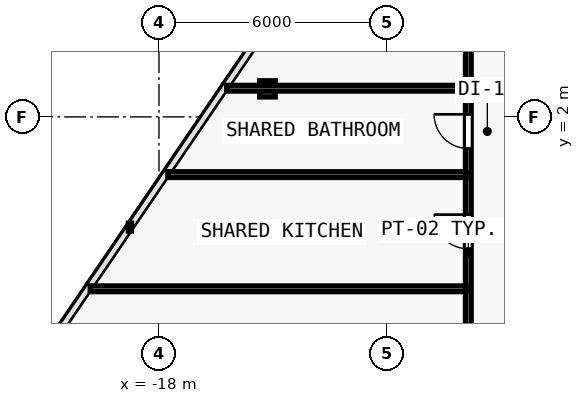
"""IFC4 building model, lengths in metres.
Left out: names, types, materials, properties, quantities, classifications, styles, units other than length and angle.
Written with IfcOpenShell. Run it as: python <this file> out.ifc"""

import sys

from ifc_helpers import new_model, si_unit, direction, frame, frame_2d, origin, origin_2d, place, context, subcontext, project, spatial, rectangle, i_section, extrude, element, fill, save


model = new_model("IFC4")
c1 = context("Model", 3, precision=1e-05, world=origin(), true_north=direction((0.0, 1.0)))
c2 = subcontext(c1, "Body", "Model", "MODEL_VIEW")
j1 = project(units=[si_unit("LENGTHUNIT", "METRE"), si_unit("PLANEANGLEUNIT", "RADIAN")], contexts=[c1])
p1 = place(None, origin())
s1 = spatial("IfcSite", under=j1, at=p1, CompositionType="ELEMENT")
p2 = place(p1, origin())
s2 = spatial("IfcBuilding", under=s1, at=p2, CompositionType="ELEMENT")
p3 = place(p2, frame((0.0, 0.0, 89.7)))
s3 = spatial("IfcBuildingStorey", under=s2, at=p3, CompositionType="ELEMENT", Elevation=89.7)
p4 = place(p3, frame((-15.146, 2.738, 0.006), z_axis=(0.017003572908, 0.009522000828, 0.999810086971), x_axis=(-0.488603368932, 0.87250601595, 0.0)))
e1 = element("IfcColumn", 1, at=p4, inside=s3, PredefinedType="COLUMN", context=c2, shape_type="SweptSolid", body=[
    extrude(i_section(OverallWidth=0.409, OverallDepth=0.425, WebThickness=0.021, FlangeThickness=0.034, FilletRadius=0.015, at=origin_2d()), origin(), (0.0, 0.0, 1.0), 3.59),
])
p5 = place(p3, frame((-9.86, -11.56, 0.0), z_axis=(0.0, 0.0, 1.0), x_axis=(0.0, 1.0, 0.0)))
e2 = element("IfcWall", 2, at=p5, inside=s3, PredefinedType="PARTITIONING", context=c2, shape_type="SweptSolid", body=[
    extrude(rectangle(XDim=19.986, YDim=0.15, at=frame_2d((9.993, 0.0))), origin(), (0.0, 0.0, 1.0), 2.609),
])
p6 = place(p5, frame((10.089, 0.0, 0.0)))
e3 = element("IfcOpeningElement", 3, at=p6, cuts=e2, PredefinedType="OPENING", context=c2, shape_type="SweptSolid", body=[
    extrude(rectangle(XDim=0.9, YDim=2.1, at=frame_2d((0.45, 1.05))), frame((0.0, 0.085, 0.0), z_axis=(0.0, -1.0, 0.0), x_axis=(1.0, 0.0, 0.0)), (0.0, 0.0, 1.0), 0.17),
])
p7 = place(p5, frame((7.047, 0.0, 0.0)))
e4 = element("IfcOpeningElement", 4, at=p7, cuts=e2, PredefinedType="OPENING", context=c2, shape_type="SweptSolid", body=[
    extrude(rectangle(XDim=0.9, YDim=2.1, at=frame_2d((0.45, 1.05))), frame((0.0, 0.085, 0.0), z_axis=(0.0, -1.0, 0.0), x_axis=(1.0, 0.0, 0.0)), (0.0, 0.0, 1.0), 0.17),
])
p8 = place(p5, frame((4.043, 0.0, 0.0)))
e5 = element("IfcOpeningElement", 5, at=p8, cuts=e2, PredefinedType="OPENING", context=c2, shape_type="SweptSolid", body=[
    extrude(rectangle(XDim=0.9, YDim=2.1, at=frame_2d((0.45, 1.05))), frame((0.0, 0.085, 0.0), z_axis=(0.0, -1.0, 0.0), x_axis=(1.0, 0.0, 0.0)), (0.0, 0.0, 1.0), 0.17),
])
p9 = place(p5, frame((1.153, 0.0, 0.0)))
e6 = element("IfcOpeningElement", 6, at=p9, cuts=e2, PredefinedType="OPENING", context=c2, shape_type="SweptSolid", body=[
    extrude(rectangle(XDim=0.9, YDim=2.1, at=frame_2d((0.45, 1.05))), frame((0.0, 0.085, 0.0), z_axis=(0.0, -1.0, 0.0), x_axis=(1.0, 0.0, 0.0)), (0.0, 0.0, 1.0), 0.17),
])
p10 = place(p5, frame((12.728, 0.0, 0.0)))
e7 = element("IfcOpeningElement", 7, at=p10, cuts=e2, PredefinedType="OPENING", context=c2, shape_type="SweptSolid", body=[
    extrude(rectangle(XDim=0.9, YDim=2.1, at=frame_2d((0.45, 1.05))), frame((0.0, 0.085, 0.0), z_axis=(0.0, -1.0, 0.0), x_axis=(1.0, 0.0, 0.0)), (0.0, 0.0, 1.0), 0.17),
])
p11 = place(p3, frame((-9.92, 2.755, 0.0), z_axis=(0.0, 0.0, 1.0), x_axis=(-1.0, 0.0, 0.0)))
e8 = element("IfcWall", 8, at=p11, inside=s3, PredefinedType="PARTITIONING", context=c2, shape_type="SweptSolid", body=[
    extrude(rectangle(XDim=6.299, YDim=0.15, at=frame_2d((3.149, 0.0))), origin(), (0.0, 0.0, 1.0), 2.835),
])
p12 = place(p3, frame((-9.92, -2.523, 0.0), z_axis=(0.0, 0.0, 1.0), x_axis=(-1.0, 0.0, 0.0)))
e9 = element("IfcWall", 9, at=p12, inside=s3, PredefinedType="PARTITIONING", context=c2, shape_type="SweptSolid", body=[
    extrude(rectangle(XDim=9.889, YDim=0.15, at=frame_2d((4.945, 0.0))), origin(), (0.0, 0.0, 1.0), 2.835),
])
p13 = place(p3, frame((-9.92, 0.482, 0.0), z_axis=(0.0, 0.0, 1.0), x_axis=(-1.0, 0.0, 0.0)))
e10 = element("IfcWall", 10, at=p13, inside=s3, PredefinedType="PARTITIONING", context=c2, shape_type="SweptSolid", body=[
    extrude(rectangle(XDim=7.845, YDim=0.15, at=frame_2d((3.923, 0.0))), origin(), (0.0, 0.0, 1.0), 2.835),
])
p14 = place(p6, origin())
e11 = element("IfcDoor", 11, at=p14, inside=s3, OperationType="SINGLE_SWING_RIGHT", PredefinedType="DOOR", context=c2, shape_type="SweptSolid", body=[
    extrude(rectangle(XDim=0.9, YDim=2.1, at=frame_2d((0.45, 1.05))), frame((0.0, 0.025, 0.0), z_axis=(0.0, -1.0, 0.0), x_axis=(1.0, 0.0, 0.0)), (0.0, 0.0, 1.0), 0.05),
])
fill(e3, e11)
p15 = place(p10, origin())
e12 = element("IfcDoor", 12, at=p15, inside=s3, OperationType="SINGLE_SWING_RIGHT", PredefinedType="DOOR", context=c2, shape_type="SweptSolid", body=[
    extrude(rectangle(XDim=0.9, YDim=2.1, at=frame_2d((0.45, 1.05))), frame((0.0, 0.025, 0.0), z_axis=(0.0, -1.0, 0.0), x_axis=(1.0, 0.0, 0.0)), (0.0, 0.0, 1.0), 0.05),
])
fill(e7, e12)
save(model, sys.argv[1])
